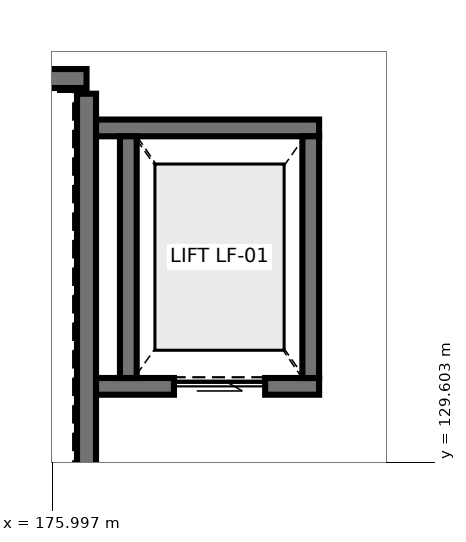
"""IFC4 building model, lengths in metres.
Left out: names, types, materials, properties, quantities, classifications, styles, units other than length and angle.
Written with IfcOpenShell. Run it as: python <this file> out.ifc"""

import sys

from ifc_helpers import new_model, si_unit, direction, frame, frame_2d, origin, place, context, subcontext, project, spatial, rectangle, extrude, element, fill, save


model = new_model("IFC4")
c1 = context("Model", 3, precision=1e-05, world=origin(), true_north=direction((0.0, 1.0)))
c2 = subcontext(c1, "Body", "Model", "MODEL_VIEW")
j1 = project(units=[si_unit("LENGTHUNIT", "METRE"), si_unit("PLANEANGLEUNIT", "RADIAN")], contexts=[c1])
p1 = place(None, origin())
s1 = spatial("IfcSite", under=j1, at=p1, CompositionType="ELEMENT")
p2 = place(p1, origin())
s2 = spatial("IfcBuilding", under=s1, at=p2, CompositionType="ELEMENT")
p3 = place(p2, origin())
s3 = spatial("IfcBuildingStorey", under=s2, at=p3, CompositionType="ELEMENT", Elevation=0.0)
p4 = place(p3, frame((168.15, 134.65, 0.0), z_axis=(0.0, 0.0, 1.0), x_axis=(1.0, 0.0, 0.0)))
e1 = element("IfcWall", 1, at=p4, inside=s3, PredefinedType="SHEAR", context=c2, shape_type="SweptSolid", body=[
    extrude(rectangle(XDim=8.3, YDim=0.25, at=frame_2d((4.15, 0.0))), origin(), (0.0, 0.0, 1.0), 5.12),
])
p5 = place(p3, frame((176.45, 134.45, 0.0), z_axis=(0.0, 0.0, 1.0), x_axis=(0.0, -1.0, 0.0)))
e2 = element("IfcWall", 2, at=p5, inside=s3, PredefinedType="SHEAR", context=c2, shape_type="SweptSolid", body=[
    extrude(rectangle(XDim=5.3, YDim=0.25, at=frame_2d((2.65, 0.0))), origin(), (0.0, 0.0, 1.0), 5.12),
])
p6 = place(p3, frame((176.575, 130.6, 0.0), z_axis=(0.0, 0.0, 1.0), x_axis=(1.0, 0.0, 0.0)))
e3 = element("IfcWall", 3, at=p6, inside=s3, PredefinedType="SHEAR", context=c2, shape_type="SweptSolid", body=[
    extrude(rectangle(XDim=2.935, YDim=0.22, at=frame_2d((1.468, 0.0))), origin(), (0.0, 0.0, 1.0), 5.12),
])
p7 = place(p6, frame((1.025, 0.0, 0.0)))
e4 = element("IfcOpeningElement", 4, at=p7, cuts=e3, PredefinedType="OPENING", context=c2, shape_type="SweptSolid", body=[
    extrude(rectangle(XDim=1.2, YDim=2.25, at=frame_2d((0.6, 1.125))), frame((0.0, 0.12, 0.0), z_axis=(0.0, -1.0, 0.0), x_axis=(1.0, 0.0, 0.0)), (0.0, 0.0, 1.0), 0.24),
])
p8 = place(p3, frame((176.575, 134.0, 0.0), z_axis=(0.0, 0.0, 1.0), x_axis=(1.0, 0.0, 0.0)))
e5 = element("IfcWall", 5, at=p8, inside=s3, PredefinedType="SHEAR", context=c2, shape_type="SweptSolid", body=[
    extrude(rectangle(XDim=2.935, YDim=0.22, at=frame_2d((1.468, 0.0))), origin(), (0.0, 0.0, 1.0), 5.12),
])
for number, where, z_axis, x_axis in (
    (6, (177.0, 130.71, 0.0), (0.0, 0.0, 1.0), (0.0, 1.0, 0.0)),
    (7, (179.4, 130.71, 0.0), (0.0, 0.0, 1.0), (0.0, 1.0, 0.0)),
):
    element("IfcWall", number, at=place(p3, frame(where, z_axis=z_axis, x_axis=x_axis)), inside=s3, PredefinedType="SHEAR", context=c2, shape_type="SweptSolid", body=[
        extrude(rectangle(XDim=3.18, YDim=0.22, at=frame_2d((1.59, 0.0))), origin(), (0.0, 0.0, 1.0), 5.12),
    ])
p9 = place(p7, origin())
e8 = element("IfcDoor", 8, at=p9, inside=s3, OperationType="SLIDING_TO_LEFT", PredefinedType="DOOR", context=c2, shape_type="SweptSolid", body=[
    extrude(rectangle(XDim=1.2, YDim=2.25, at=frame_2d((0.6, 1.125))), frame((0.0, 0.025, 0.0), z_axis=(0.0, -1.0, 0.0), x_axis=(1.0, 0.0, 0.0)), (0.0, 0.0, 1.0), 0.05),
])
fill(e4, e8)
save(model, sys.argv[1])
